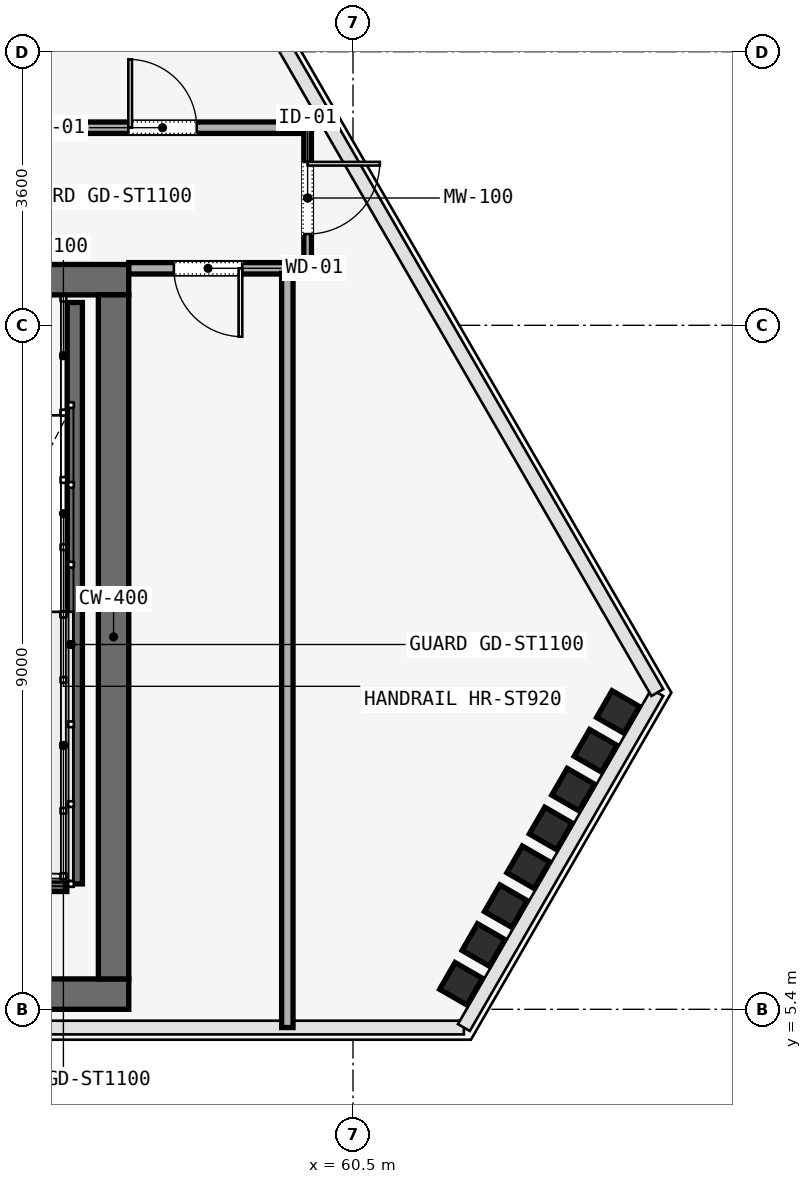
"""IFC4 building model, lengths in metres.
Left out: names, types, materials, properties, quantities, classifications, styles, units other than length and angle.
Written with IfcOpenShell. Run it as: python <this file> out.ifc"""

import sys

from ifc_helpers import new_model, si_unit, direction, frame, frame_2d, origin, origin_2d, place, context, subcontext, project, spatial, rectangle, i_section, extrude, element, fill, save


model = new_model("IFC4")
c1 = context("Model", 3, precision=1e-05, world=origin(), true_north=direction((0.0, 1.0)))
c2 = subcontext(c1, "Body", "Model", "MODEL_VIEW")
j1 = project(units=[si_unit("LENGTHUNIT", "METRE"), si_unit("PLANEANGLEUNIT", "RADIAN")], contexts=[c1])
p1 = place(None, origin())
s1 = spatial("IfcSite", under=j1, at=p1, CompositionType="ELEMENT")
p2 = place(p1, origin())
s2 = spatial("IfcBuilding", under=s1, at=p2, CompositionType="ELEMENT")
p3 = place(p2, frame((0.0, 0.0, 275.0)))
s3 = spatial("IfcBuildingStorey", under=s2, at=p3, CompositionType="ELEMENT", Elevation=275.0)
p4 = place(p3, frame((26.45, 15.0, 0.0), z_axis=(0.0, 0.0, 1.0), x_axis=(1.0, 0.0, 0.0)))
e1 = element("IfcWall", 1, at=p4, inside=s3, PredefinedType="SOLIDWALL", context=c2, shape_type="SweptSolid", body=[
    extrude(rectangle(XDim=31.1, YDim=0.4, at=frame_2d((15.55, 0.0))), origin(), (0.0, 0.0, 1.0), 3.52),
])
p5 = place(p4, frame((1.65, 0.0, 0.0)))
e2 = element("IfcOpeningElement", 2, at=p5, cuts=e1, PredefinedType="OPENING", context=c2, shape_type="SweptSolid", body=[
    extrude(rectangle(XDim=1.1, YDim=2.2, at=frame_2d((0.55, 1.1))), frame((0.0, 0.2, 0.0), z_axis=(0.0, -1.0, 0.0), x_axis=(1.0, 0.0, 0.0)), (0.0, 0.0, 1.0), 0.4),
])
p6 = place(p4, frame((13.65, 0.0, 0.0)))
e3 = element("IfcOpeningElement", 3, at=p6, cuts=e1, PredefinedType="OPENING", context=c2, shape_type="SweptSolid", body=[
    extrude(rectangle(XDim=1.1, YDim=2.2, at=frame_2d((0.55, 1.1))), frame((0.0, 0.2, 0.0), z_axis=(0.0, -1.0, 0.0), x_axis=(1.0, 0.0, 0.0)), (0.0, 0.0, 1.0), 0.4),
])
p7 = place(p4, frame((25.55, 0.0, 0.0)))
e4 = element("IfcOpeningElement", 4, at=p7, cuts=e1, PredefinedType="OPENING", context=c2, shape_type="SweptSolid", body=[
    extrude(rectangle(XDim=1.1, YDim=2.2, at=frame_2d((0.55, 1.1))), frame((0.0, 0.2, 0.0), z_axis=(0.0, -1.0, 0.0), x_axis=(1.0, 0.0, 0.0)), (0.0, 0.0, 1.0), 0.4),
])
p8 = place(p4, frame((19.35, 0.0, 0.0)))
e5 = element("IfcOpeningElement", 5, at=p8, cuts=e1, PredefinedType="OPENING", context=c2, shape_type="SweptSolid", body=[
    extrude(rectangle(XDim=1.1, YDim=2.2, at=frame_2d((0.55, 1.1))), frame((0.0, 0.2, 0.0), z_axis=(0.0, -1.0, 0.0), x_axis=(1.0, 0.0, 0.0)), (0.0, 0.0, 1.0), 0.4),
])
p9 = place(p4, frame((21.4, 0.0, 0.0)))
e6 = element("IfcOpeningElement", 6, at=p9, cuts=e1, PredefinedType="OPENING", context=c2, shape_type="SweptSolid", body=[
    extrude(rectangle(XDim=0.9, YDim=2.1, at=frame_2d((0.45, 1.05))), frame((0.0, 0.2, 0.0), z_axis=(0.0, -1.0, 0.0), x_axis=(1.0, 0.0, 0.0)), (0.0, 0.0, 1.0), 0.4),
])
p10 = place(p4, frame((5.54, 0.0, 0.0)))
e7 = element("IfcOpeningElement", 7, at=p10, cuts=e1, PredefinedType="OPENING", context=c2, shape_type="SweptSolid", body=[
    extrude(rectangle(XDim=0.95, YDim=2.2, at=frame_2d((0.475, 1.1))), frame((0.0, 0.2, 0.0), z_axis=(0.0, -1.0, 0.0), x_axis=(1.0, 0.0, 0.0)), (0.0, 0.0, 1.0), 0.4),
])
p11 = place(p4, frame((9.49, 0.0, 0.0)))
e8 = element("IfcOpeningElement", 8, at=p11, cuts=e1, PredefinedType="OPENING", context=c2, shape_type="SweptSolid", body=[
    extrude(rectangle(XDim=0.95, YDim=2.2, at=frame_2d((0.475, 1.1))), frame((0.0, 0.2, 0.0), z_axis=(0.0, -1.0, 0.0), x_axis=(1.0, 0.0, 0.0)), (0.0, 0.0, 1.0), 0.4),
])
p12 = place(p4, frame((23.35, 0.0, 0.0)))
e9 = element("IfcOpeningElement", 9, at=p12, cuts=e1, PredefinedType="OPENING", context=c2, shape_type="SweptSolid", body=[
    extrude(rectangle(XDim=1.3, YDim=2.3, at=frame_2d((0.65, 1.15))), frame((0.0, 0.2, 0.0), z_axis=(0.0, -1.0, 0.0), x_axis=(1.0, 0.0, 0.0)), (0.0, 0.0, 1.0), 0.4),
])
p13 = place(p3, frame((26.45, 5.6, 0.0), z_axis=(0.0, 0.0, 1.0), x_axis=(1.0, 0.0, 0.0)))
e10 = element("IfcWall", 10, at=p13, inside=s3, PredefinedType="SOLIDWALL", context=c2, shape_type="SweptSolid", body=[
    extrude(rectangle(XDim=31.1, YDim=0.4, at=frame_2d((15.55, 0.0))), origin(), (0.0, 0.0, 1.0), 3.52),
])
p14 = place(p3, frame((57.35, 5.8, 0.0), z_axis=(0.0, 0.0, 1.0), x_axis=(0.0, 1.0, 0.0)))
e11 = element("IfcWall", 11, at=p14, inside=s3, PredefinedType="SOLIDWALL", context=c2, shape_type="SweptSolid", body=[
    extrude(rectangle(XDim=9.0, YDim=0.4, at=frame_2d((4.5, 0.0))), origin(), (0.0, 0.0, 1.0), 3.52),
])
p15 = place(p3, frame((61.922, 5.736, 0.0), z_axis=(0.011581784156, -0.005617512076, 0.999917149485), x_axis=(-0.560938958584, 0.827782105459, 0.011147673507)))
e12 = element("IfcColumn", 12, at=p15, inside=s3, PredefinedType="COLUMN", context=c2, shape_type="SweptSolid", body=[
    extrude(i_section(OverallWidth=0.406, OverallDepth=0.416, WebThickness=0.03, FlangeThickness=0.037, FilletRadius=0.015, at=origin_2d()), origin(), (0.0, 0.0, 1.0), 3.52),
])
p16 = place(p3, frame((62.217, 6.246, 0.0), z_axis=(0.005131682914, -0.016781990071, 0.999846003462), x_axis=(0.224941540665, 0.974253727867, 0.015197928155)))
e13 = element("IfcColumn", 13, at=p16, inside=s3, PredefinedType="COLUMN", context=c2, shape_type="SweptSolid", body=[
    extrude(i_section(OverallWidth=0.406, OverallDepth=0.416, WebThickness=0.03, FlangeThickness=0.037, FilletRadius=0.015, at=origin_2d()), origin(), (0.0, 0.0, 1.0), 3.521),
])
p17 = place(p3, frame((62.512, 6.757, 0.0), z_axis=(-0.00138660937, -0.028009509279, 0.999606695008), x_axis=(0.542191703835, 0.839903753308, 0.02428665213)))
e14 = element("IfcColumn", 14, at=p17, inside=s3, PredefinedType="COLUMN", context=c2, shape_type="SweptSolid", body=[
    extrude(i_section(OverallWidth=0.406, OverallDepth=0.416, WebThickness=0.03, FlangeThickness=0.037, FilletRadius=0.015, at=origin_2d()), origin(), (0.0, 0.0, 1.0), 3.521),
])
p18 = place(p3, frame((62.807, 7.268, 0.0), z_axis=(-0.007831153253, -0.039225068506, 0.99919971329), x_axis=(0.65974093121, 0.750694314596, 0.034640290421)))
e15 = element("IfcColumn", 15, at=p18, inside=s3, PredefinedType="COLUMN", context=c2, shape_type="SweptSolid", body=[
    extrude(i_section(OverallWidth=0.406, OverallDepth=0.416, WebThickness=0.03, FlangeThickness=0.037, FilletRadius=0.015, at=origin_2d()), origin(), (0.0, 0.0, 1.0), 3.523),
])
p19 = place(p3, frame((63.102, 7.779, 0.0), z_axis=(-0.014268064992, -0.050423064632, 0.998626024533), x_axis=(0.716583758046, 0.696023110507, 0.045382235997)))
e16 = element("IfcColumn", 16, at=p19, inside=s3, PredefinedType="COLUMN", context=c2, shape_type="SweptSolid", body=[
    extrude(i_section(OverallWidth=0.406, OverallDepth=0.416, WebThickness=0.03, FlangeThickness=0.037, FilletRadius=0.015, at=origin_2d()), origin(), (0.0, 0.0, 1.0), 3.525),
])
p20 = place(p3, frame((63.397, 8.29, 0.0), z_axis=(-0.020763317909, -0.061597843129, 0.997885058687), x_axis=(0.749847531911, 0.659211363411, 0.05629438015)))
e17 = element("IfcColumn", 17, at=p20, inside=s3, PredefinedType="COLUMN", context=c2, shape_type="SweptSolid", body=[
    extrude(i_section(OverallWidth=0.406, OverallDepth=0.416, WebThickness=0.03, FlangeThickness=0.037, FilletRadius=0.015, at=origin_2d()), origin(), (0.0, 0.0, 1.0), 3.528),
])
p21 = place(p3, frame((63.692, 8.801, 0.0), z_axis=(-0.027175422808, -0.072675240131, 0.996985358903), x_axis=(0.770735243649, 0.633602429445, 0.067194833132)))
e18 = element("IfcColumn", 18, at=p21, inside=s3, PredefinedType="COLUMN", context=c2, shape_type="SweptSolid", body=[
    extrude(i_section(OverallWidth=0.406, OverallDepth=0.416, WebThickness=0.03, FlangeThickness=0.037, FilletRadius=0.015, at=origin_2d()), origin(), (0.0, 0.0, 1.0), 3.531),
])
p22 = place(p3, frame((63.987, 9.312, 0.0), z_axis=(-0.033570270082, -0.083787525944, 0.99591801242), x_axis=(0.784908715569, 0.614660738798, 0.078169587455)))
e19 = element("IfcColumn", 19, at=p22, inside=s3, PredefinedType="COLUMN", context=c2, shape_type="SweptSolid", body=[
    extrude(i_section(OverallWidth=0.406, OverallDepth=0.416, WebThickness=0.03, FlangeThickness=0.037, FilletRadius=0.015, at=origin_2d()), origin(), (0.0, 0.0, 1.0), 3.534),
])
p23 = place(p3, frame((56.84, 14.7, 0.0), z_axis=(0.0, 0.0, 1.0), x_axis=(0.0, -1.0, 0.0)))
e20 = element("IfcWall", 20, at=p23, inside=s3, PredefinedType="SOLIDWALL", context=c2, shape_type="SweptSolid", body=[
    extrude(rectangle(XDim=7.65, YDim=0.2, at=frame_2d((3.825, 0.0))), origin(), (0.0, 0.0, 1.0), 3.8),
])
p24 = place(p3, frame((53.62, 7.05, 0.0), z_axis=(0.0, 0.0, 1.0), x_axis=(1.0, 0.0, 0.0)))
e21 = element("IfcWall", 21, at=p24, inside=s3, PredefinedType="SOLIDWALL", context=c2, shape_type="SweptSolid", body=[
    extrude(rectangle(XDim=3.115, YDim=0.2, at=frame_2d((1.558, 0.0))), origin(), (0.0, 0.0, 1.0), 3.8),
])
p25 = place(p3, frame((59.903, 17.0, 0.0), z_axis=(0.0, 0.0, 1.0), x_axis=(0.0, -1.0, 0.0)))
e22 = element("IfcWall", 22, at=p25, inside=s3, PredefinedType="MOVABLE", context=c2, shape_type="SweptSolid", body=[
    extrude(rectangle(XDim=1.85, YDim=0.1, at=frame_2d((0.925, 0.0))), origin(), (0.0, 0.0, 1.0), 2.95),
])
p26 = place(p25, frame((0.45, 0.0, 0.0)))
e23 = element("IfcOpeningElement", 23, at=p26, cuts=e22, PredefinedType="OPENING", context=c2, shape_type="SweptSolid", body=[
    extrude(rectangle(XDim=0.95, YDim=2.2, at=frame_2d((0.475, 1.1))), frame((0.0, 0.05, 0.0), z_axis=(0.0, -1.0, 0.0), x_axis=(1.0, 0.0, 0.0)), (0.0, 0.0, 1.0), 0.1),
])
p27 = place(p3, frame((59.636, 15.15, 0.0), z_axis=(0.0, 0.0, 1.0), x_axis=(-1.0, 0.0, 0.0)))
e24 = element("IfcWall", 24, at=p27, inside=s3, PredefinedType="PARTITIONING", context=c2, shape_type="SweptSolid", body=[
    extrude(rectangle(XDim=2.086, YDim=0.15, at=frame_2d((1.043, 0.0))), origin(), (0.0, 0.0, 1.0), 2.95),
])
p28 = place(p27, frame((0.593, 0.0, 0.0)))
e25 = element("IfcOpeningElement", 25, at=p28, cuts=e24, PredefinedType="OPENING", context=c2, shape_type="SweptSolid", body=[
    extrude(rectangle(XDim=0.9, YDim=2.15, at=frame_2d((0.45, 1.075))), frame((0.0, 0.075, 0.0), z_axis=(0.0, -1.0, 0.0), x_axis=(1.0, 0.0, 0.0)), (0.0, 0.0, 1.0), 0.15),
])
p29 = place(p3, frame((56.15, 17.0, 0.0), z_axis=(0.0, 0.0, 1.0), x_axis=(1.0, 0.0, 0.0)))
e26 = element("IfcWall", 26, at=p29, inside=s3, PredefinedType="PARTITIONING", context=c2, shape_type="SweptSolid", body=[
    extrude(rectangle(XDim=3.688, YDim=0.15, at=frame_2d((1.844, 0.0))), origin(), (0.0, 0.0, 1.0), 2.95),
])
p30 = place(p29, frame((1.394, 0.0, 0.0)))
e27 = element("IfcOpeningElement", 27, at=p30, cuts=e26, PredefinedType="OPENING", context=c2, shape_type="SweptSolid", body=[
    extrude(rectangle(XDim=0.9, YDim=2.15, at=frame_2d((0.45, 1.075))), frame((0.0, 0.075, 0.0), z_axis=(0.0, -1.0, 0.0), x_axis=(1.0, 0.0, 0.0)), (0.0, 0.0, 1.0), 0.15),
])
p31 = place(p3, frame((59.636, 15.085, 0.0), z_axis=(0.0, 0.0, 1.0), x_axis=(0.0, -1.0, 0.0)))
e28 = element("IfcWall", 28, at=p31, inside=s3, PredefinedType="PARTITIONING", context=c2, shape_type="SweptSolid", body=[
    extrude(rectangle(XDim=9.925, YDim=0.15, at=frame_2d((4.962, 0.0))), origin(), (0.0, 0.0, 1.0), 2.95),
])
p32 = place(p28, origin())
e29 = element("IfcDoor", 29, at=p32, inside=s3, OperationType="SINGLE_SWING_RIGHT", PredefinedType="DOOR", context=c2, shape_type="SweptSolid", body=[
    extrude(rectangle(XDim=0.9, YDim=2.15, at=frame_2d((0.45, 1.075))), frame((0.0, 0.025, 0.0), z_axis=(0.0, -1.0, 0.0), x_axis=(1.0, 0.0, 0.0)), (0.0, 0.0, 1.0), 0.05),
])
fill(e25, e29)
p33 = place(p26, origin())
e30 = element("IfcDoor", 30, at=p33, inside=s3, OperationType="SINGLE_SWING_RIGHT", PredefinedType="DOOR", context=c2, shape_type="SweptSolid", body=[
    extrude(rectangle(XDim=0.95, YDim=2.2, at=frame_2d((0.475, 1.1))), frame((0.0, 0.025, 0.0), z_axis=(0.0, -1.0, 0.0), x_axis=(1.0, 0.0, 0.0)), (0.0, 0.0, 1.0), 0.05),
])
fill(e23, e30)
p34 = place(p30, origin())
e31 = element("IfcDoor", 31, at=p34, inside=s3, OperationType="SINGLE_SWING_LEFT", PredefinedType="DOOR", context=c2, shape_type="SweptSolid", body=[
    extrude(rectangle(XDim=0.9, YDim=2.15, at=frame_2d((0.45, 1.075))), frame((0.0, 0.025, 0.0), z_axis=(0.0, -1.0, 0.0), x_axis=(1.0, 0.0, 0.0)), (0.0, 0.0, 1.0), 0.05),
])
fill(e27, e31)
save(model, sys.argv[1])
